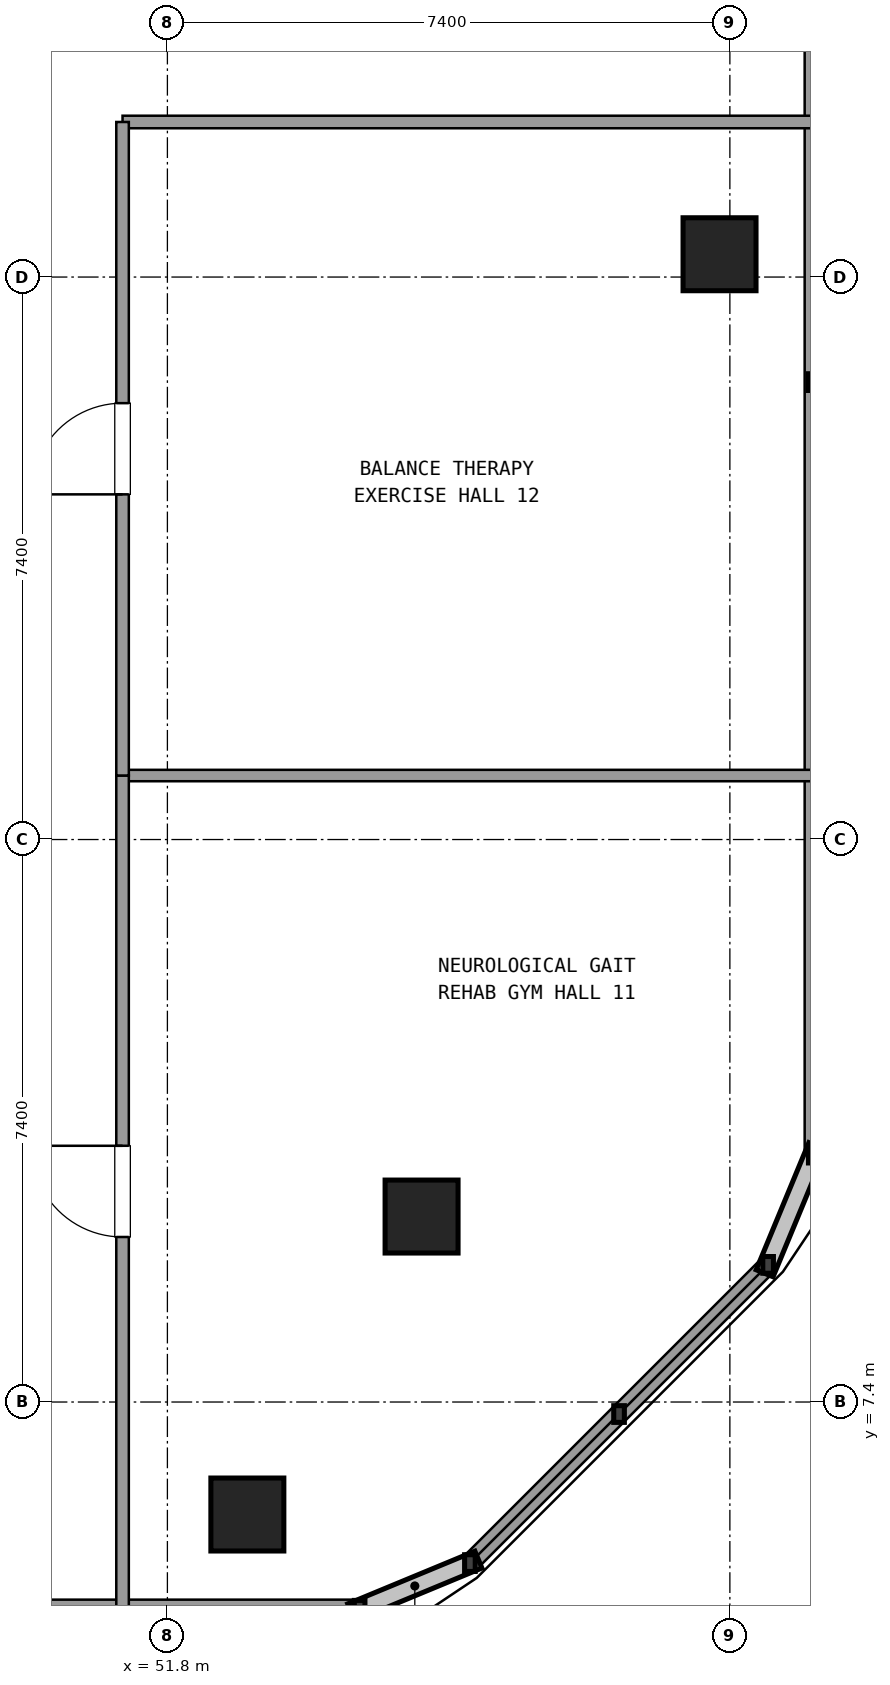
"""IFC4 building model, lengths in metres.
Left out: names, types, materials, properties, quantities, classifications, styles, units other than length and angle.
Written with IfcOpenShell. Run it as: python <this file> out.ifc"""

import sys

from ifc_helpers import new_model, si_unit, direction, frame, frame_2d, origin, origin_2d, place, context, subcontext, project, spatial, rectangle, extrude, element, fill, save


model = new_model("IFC4")
c1 = context("Model", 3, precision=1e-05, world=origin(), true_north=direction((0.0, 1.0)))
c2 = subcontext(c1, "Body", "Model", "MODEL_VIEW")
j1 = project(units=[si_unit("LENGTHUNIT", "METRE"), si_unit("PLANEANGLEUNIT", "RADIAN")], contexts=[c1])
p1 = place(None, origin())
s1 = spatial("IfcSite", under=j1, at=p1, CompositionType="ELEMENT")
p2 = place(p1, origin())
s2 = spatial("IfcBuilding", under=s1, at=p2, CompositionType="ELEMENT")
p3 = place(p2, frame((0.0, 0.0, 167.22)))
s3 = spatial("IfcBuildingStorey", under=s2, at=p3, CompositionType="ELEMENT", Elevation=167.22)
for number, where, z_axis, x_axis in (
    (1, (52.852, 5.92, 0.0), (0.0, 0.0, 1.0), (1.0, 0.0, 0.0)),
    (2, (55.144, 9.84, 0.0), (0.0, 0.0, 1.0), (1.0, 0.0, 0.0)),
    (3, (59.064, 22.5, 0.0), (0.0, 0.0, 1.0), (1.0, 0.0, 0.0)),
):
    element("IfcColumn", number, at=place(p3, frame(where, z_axis=z_axis, x_axis=x_axis)), inside=s3, PredefinedType="COLUMN", context=c2, shape_type="SweptSolid", body=[
        extrude(rectangle(XDim=0.96, YDim=0.96, at=origin_2d()), origin(), (0.0, 0.0, 1.0), 3.6),
    ])
p4 = place(p3, frame((38.539, 4.68, 0.0), z_axis=(0.0, 0.0, 1.0), x_axis=(1.0, 0.0, 0.0)))
e4 = element("IfcWall", 4, at=p4, inside=s3, PredefinedType="SOLIDWALL", context=c2, shape_type="SweptSolid", body=[
    extrude(rectangle(XDim=15.79, YDim=0.24, at=frame_2d((7.895, 0.0))), origin(), (0.0, 0.0, 1.0), 0.85),
])
p5 = place(p3, frame((55.78, 5.281, 0.0), z_axis=(0.0, 0.0, 1.0), x_axis=(0.707084777957, 0.707128783731, 0.0)))
e5 = element("IfcWall", 5, at=p5, inside=s3, PredefinedType="SOLIDWALL", context=c2, shape_type="SweptSolid", body=[
    extrude(rectangle(XDim=5.548, YDim=0.24, at=frame_2d((2.774, 0.0))), origin(), (0.0, 0.0, 1.0), 0.85),
])
p6 = place(p3, frame((60.304, 10.655, 0.0), z_axis=(0.0, 0.0, 1.0), x_axis=(0.0, 1.0, 0.0)))
e6 = element("IfcWall", 6, at=p6, inside=s3, PredefinedType="SOLIDWALL", context=c2, shape_type="SweptSolid", body=[
    extrude(rectangle(XDim=30.49, YDim=0.24, at=frame_2d((15.245, 0.0))), origin(), (0.0, 0.0, 1.0), 0.85),
])
p7 = place(p3, frame((51.21, 24.24, 0.0), z_axis=(0.0, 0.0, 1.0), x_axis=(1.0, 0.0, 0.0)))
e7 = element("IfcWall", 7, at=p7, inside=s3, PredefinedType="PARTITIONING", context=c2, shape_type="SweptSolid", body=[
    extrude(rectangle(XDim=9.074, YDim=0.165, at=frame_2d((4.537, 0.0))), origin(), (0.0, 0.0, 1.0), 2.61),
])
p8 = place(p3, frame((51.21, 15.642, 0.0), z_axis=(0.0, 0.0, 1.0), x_axis=(1.0, 0.0, 0.0)))
e8 = element("IfcWall", 8, at=p8, inside=s3, PredefinedType="PARTITIONING", context=c2, shape_type="SweptSolid", body=[
    extrude(rectangle(XDim=9.074, YDim=0.15, at=frame_2d((4.537, 0.0))), origin(), (0.0, 0.0, 1.0), 2.61),
])
p9 = place(p3, frame((51.21, 4.7, 0.0), z_axis=(0.0, 0.0, 1.0), x_axis=(0.0, 1.0, 0.0)))
e9 = element("IfcWall", 9, at=p9, inside=s3, PredefinedType="PARTITIONING", context=c2, shape_type="SweptSolid", body=[
    extrude(rectangle(XDim=10.942, YDim=0.165, at=frame_2d((5.471, 0.0))), origin(), (0.0, 0.0, 1.0), 2.61),
])
p10 = place(p9, frame((4.871, 0.0, 0.0)))
e10 = element("IfcOpeningElement", 10, at=p10, cuts=e9, PredefinedType="OPENING", context=c2, shape_type="SweptSolid", body=[
    extrude(rectangle(XDim=1.2, YDim=2.15, at=frame_2d((0.6, 1.075))), frame((0.0, 0.093, 0.0), z_axis=(0.0, -1.0, 0.0), x_axis=(1.0, 0.0, 0.0)), (0.0, 0.0, 1.0), 0.185),
])
p11 = place(p3, frame((51.21, 15.642, 0.0), z_axis=(0.0, 0.0, 1.0), x_axis=(0.0, 1.0, 0.0)))
e11 = element("IfcWall", 11, at=p11, inside=s3, PredefinedType="PARTITIONING", context=c2, shape_type="SweptSolid", body=[
    extrude(rectangle(XDim=8.598, YDim=0.165, at=frame_2d((4.299, 0.0))), origin(), (0.0, 0.0, 1.0), 2.61),
])
p12 = place(p11, frame((3.699, 0.0, 0.0)))
e12 = element("IfcOpeningElement", 12, at=p12, cuts=e11, PredefinedType="OPENING", context=c2, shape_type="SweptSolid", body=[
    extrude(rectangle(XDim=1.2, YDim=2.15, at=frame_2d((0.6, 1.075))), frame((0.0, 0.093, 0.0), z_axis=(0.0, -1.0, 0.0), x_axis=(1.0, 0.0, 0.0)), (0.0, 0.0, 1.0), 0.185),
])
p13 = place(p10, origin())
e13 = element("IfcDoor", 13, at=p13, inside=s3, OperationType="SINGLE_SWING_RIGHT", PredefinedType="DOOR", context=c2, shape_type="SweptSolid", body=[
    extrude(rectangle(XDim=1.2, YDim=2.15, at=frame_2d((0.6, 1.075))), frame((0.0, 0.025, 0.0), z_axis=(0.0, -1.0, 0.0), x_axis=(1.0, 0.0, 0.0)), (0.0, 0.0, 1.0), 0.05),
])
fill(e10, e13)
p14 = place(p12, origin())
e14 = element("IfcDoor", 14, at=p14, inside=s3, OperationType="SINGLE_SWING_LEFT", PredefinedType="DOOR", context=c2, shape_type="SweptSolid", body=[
    extrude(rectangle(XDim=1.2, YDim=2.15, at=frame_2d((0.6, 1.075))), frame((0.0, 0.025, 0.0), z_axis=(0.0, -1.0, 0.0), x_axis=(1.0, 0.0, 0.0)), (0.0, 0.0, 1.0), 0.05),
])
fill(e12, e14)
save(model, sys.argv[1])
